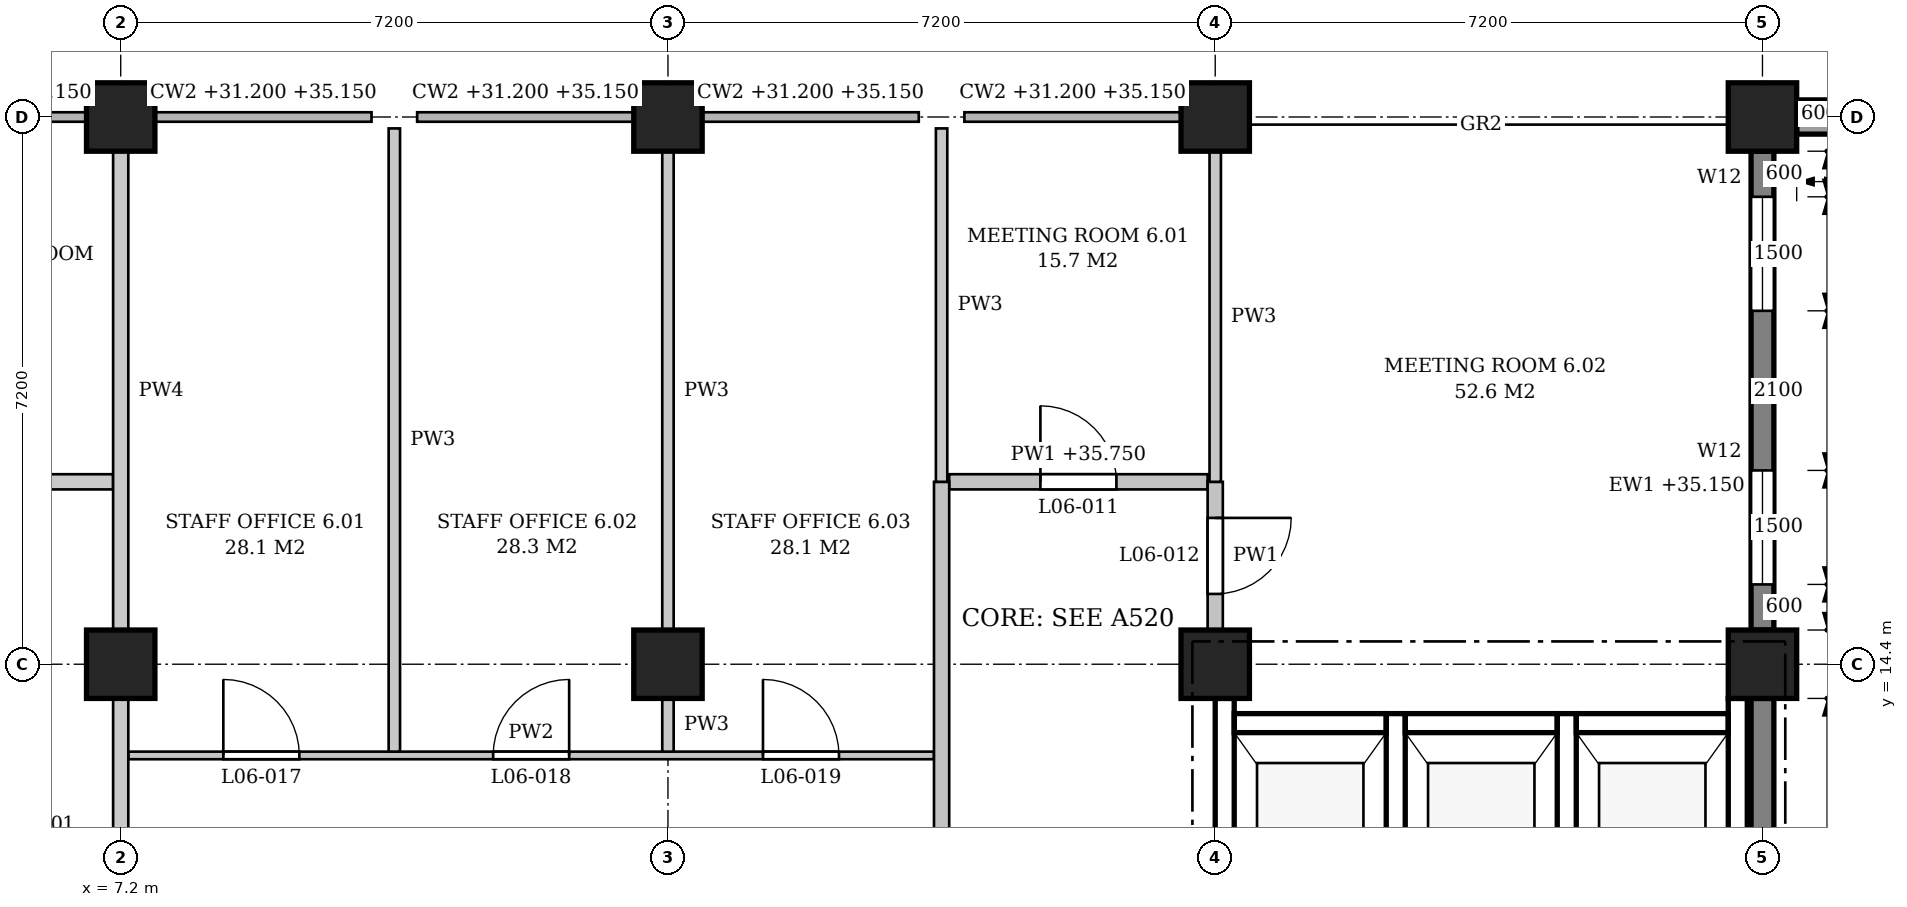
"""IFC4 building model, lengths in metres.
Left out: names, types, materials, properties, quantities, classifications, styles, units other than length and angle.
Written with IfcOpenShell. Run it as: python <this file> out.ifc"""

import sys

from ifc_helpers import new_model, si_unit, direction, frame, frame_2d, origin, origin_2d, place, context, subcontext, project, spatial, polyline, rectangle, outline, extrude, element, fill, save


model = new_model("IFC4")
c1 = context("Model", 3, precision=1e-05, world=origin(), true_north=direction((0.0, 1.0)))
c2 = subcontext(c1, "Body", "Model", "MODEL_VIEW")
j1 = project(units=[si_unit("LENGTHUNIT", "METRE"), si_unit("PLANEANGLEUNIT", "RADIAN")], contexts=[c1])
p1 = place(None, origin())
s1 = spatial("IfcSite", under=j1, at=p1, CompositionType="ELEMENT")
p2 = place(p1, origin())
s2 = spatial("IfcBuilding", under=s1, at=p2, CompositionType="ELEMENT")
p3 = place(p2, frame((0.0, 0.0, 31.2)))
s3 = spatial("IfcBuildingStorey", under=s2, at=p3, CompositionType="ELEMENT", Elevation=31.2)
for number, where, z_axis, x_axis in (
    (1, (7.2, 14.4, 0.0), (0.0, 0.0, 1.0), (1.0, 0.0, 0.0)),
    (2, (7.2, 21.6, 0.0), (0.0, 0.0, 1.0), (1.0, 0.0, 0.0)),
    (3, (14.4, 14.4, 0.0), (0.0, 0.0, 1.0), (1.0, 0.0, 0.0)),
    (4, (14.4, 21.6, 0.0), (0.0, 0.0, 1.0), (1.0, 0.0, 0.0)),
    (5, (21.6, 14.4, 0.0), (0.0, 0.0, 1.0), (1.0, 0.0, 0.0)),
    (6, (21.6, 21.6, 0.0), (0.0, 0.0, 1.0), (1.0, 0.0, 0.0)),
    (7, (28.8, 14.4, 0.0), (0.0, 0.0, 1.0), (1.0, 0.0, 0.0)),
    (8, (28.8, 21.6, 0.0), (0.0, 0.0, 1.0), (1.0, 0.0, 0.0)),
):
    element("IfcColumn", number, at=place(p3, frame(where, z_axis=z_axis, x_axis=x_axis)), inside=s3, PredefinedType="COLUMN", context=c2, shape_type="SweptSolid", body=[
        extrude(rectangle(XDim=0.9, YDim=0.9, at=origin_2d()), origin(), (0.0, 0.0, 1.0), 4.8),
    ])
p4 = place(p3, frame((28.8, 7.65, 0.0), z_axis=(0.0, 0.0, 1.0), x_axis=(0.0, 1.0, 0.0)))
e9 = element("IfcWall", 9, at=p4, inside=s3, PredefinedType="STANDARD", context=c2, shape_type="SweptSolid", body=[
    extrude(rectangle(XDim=6.3, YDim=0.3, at=frame_2d((3.15, 0.0))), origin(), (0.0, 0.0, 1.0), 3.95),
])
p5 = place(p4, frame((0.6, 0.0, 0.9)))
e10 = element("IfcOpeningElement", 10, at=p5, cuts=e9, PredefinedType="OPENING", context=c2, shape_type="SweptSolid", body=[
    extrude(outline(polyline([(0.0, 0.0), (1.5, 0.0), (1.5, 1.75), (0.75, 2.5), (0.0, 1.75), (0.0, 0.0)])), frame((0.0, 0.16, 0.0), z_axis=(0.0, -1.0, 0.0), x_axis=(1.0, 0.0, 0.0)), (0.0, 0.0, 1.0), 0.32),
])
p6 = place(p3, frame((28.8, 14.85, 0.0), z_axis=(0.0, 0.0, 1.0), x_axis=(0.0, 1.0, 0.0)))
e11 = element("IfcWall", 11, at=p6, inside=s3, PredefinedType="STANDARD", context=c2, shape_type="SweptSolid", body=[
    extrude(rectangle(XDim=6.3, YDim=0.3, at=frame_2d((3.15, 0.0))), origin(), (0.0, 0.0, 1.0), 3.95),
])
p7 = place(p6, frame((0.6, 0.0, 0.9)))
e12 = element("IfcOpeningElement", 12, at=p7, cuts=e11, PredefinedType="OPENING", context=c2, shape_type="SweptSolid", body=[
    extrude(outline(polyline([(0.0, 0.0), (1.5, 0.0), (1.5, 1.75), (0.75, 2.5), (0.0, 1.75), (0.0, 0.0)])), frame((0.0, 0.16, 0.0), z_axis=(0.0, -1.0, 0.0), x_axis=(1.0, 0.0, 0.0)), (0.0, 0.0, 1.0), 0.32),
])
p8 = place(p6, frame((4.2, 0.0, 0.9)))
e13 = element("IfcOpeningElement", 13, at=p8, cuts=e11, PredefinedType="OPENING", context=c2, shape_type="SweptSolid", body=[
    extrude(outline(polyline([(0.0, 0.0), (1.5, 0.0), (1.5, 1.75), (0.75, 2.5), (0.0, 1.75), (0.0, 0.0)])), frame((0.0, 0.16, 0.0), z_axis=(0.0, -1.0, 0.0), x_axis=(1.0, 0.0, 0.0)), (0.0, 0.0, 1.0), 0.32),
])
p9 = place(p3, frame((29.25, 21.6, 0.0), z_axis=(0.0, 0.0, 1.0), x_axis=(1.0, 0.0, 0.0)))
e14 = element("IfcWall", 14, at=p9, inside=s3, PredefinedType="STANDARD", context=c2, shape_type="SweptSolid", body=[
    extrude(rectangle(XDim=6.375, YDim=0.45, at=frame_2d((3.188, 0.0))), origin(), (0.0, 0.0, 1.0), 3.5),
])
p10 = place(p9, frame((0.6, 0.0, 0.9)))
e15 = element("IfcOpeningElement", 15, at=p10, cuts=e14, PredefinedType="OPENING", context=c2, shape_type="SweptSolid", body=[
    extrude(outline(polyline([(0.0, 0.0), (1.5, 0.0), (1.5, 1.75), (0.75, 2.5), (0.0, 1.75), (0.0, 0.0)])), frame((0.0, 0.235, 0.0), z_axis=(0.0, -1.0, 0.0), x_axis=(1.0, 0.0, 0.0)), (0.0, 0.0, 1.0), 0.47),
])
p11 = place(p9, frame((4.2, 0.0, 0.9)))
e16 = element("IfcOpeningElement", 16, at=p11, cuts=e14, PredefinedType="OPENING", context=c2, shape_type="SweptSolid", body=[
    extrude(outline(polyline([(0.0, 0.0), (1.5, 0.0), (1.5, 1.75), (0.75, 2.5), (0.0, 1.75), (0.0, 0.0)])), frame((0.0, 0.235, 0.0), z_axis=(0.0, -1.0, 0.0), x_axis=(1.0, 0.0, 0.0)), (0.0, 0.0, 1.0), 0.47),
])
p12 = place(p3, frame((21.725, 10.45, -0.25), z_axis=(0.0, 0.0, 1.0), x_axis=(0.0, 1.0, 0.0)))
e17 = element("IfcWall", 17, at=p12, inside=s3, PredefinedType="SHEAR", context=c2, shape_type="SweptSolid", body=[
    extrude(rectangle(XDim=3.5, YDim=0.25, at=frame_2d((1.75, 0.0))), origin(), (0.0, 0.0, 1.0), 4.05),
])
for number, where, z_axis, x_axis in (
    (18, (23.975, 10.45, -0.25), (0.0, 0.0, 1.0), (0.0, 1.0, 0.0)),
    (19, (26.225, 10.45, -0.25), (0.0, 0.0, 1.0), (0.0, 1.0, 0.0)),
):
    element("IfcWall", number, at=place(p3, frame(where, z_axis=z_axis, x_axis=x_axis)), inside=s3, PredefinedType="SHEAR", context=c2, shape_type="SweptSolid", body=[
        extrude(rectangle(XDim=3.3, YDim=0.25, at=frame_2d((1.65, 0.0))), origin(), (0.0, 0.0, 1.0), 4.8),
    ])
p13 = place(p3, frame((28.475, 10.45, -0.25), z_axis=(0.0, 0.0, 1.0), x_axis=(0.0, 1.0, 0.0)))
e20 = element("IfcWall", 20, at=p13, inside=s3, PredefinedType="SHEAR", context=c2, shape_type="SweptSolid", body=[
    extrude(rectangle(XDim=3.5, YDim=0.25, at=frame_2d((1.75, 0.0))), origin(), (0.0, 0.0, 1.0), 4.8),
])
for number, where, z_axis, x_axis in (
    (21, (21.85, 13.625, -0.25), (0.0, 0.0, 1.0), (1.0, 0.0, 0.0)),
    (22, (24.1, 13.625, -0.25), (0.0, 0.0, 1.0), (1.0, 0.0, 0.0)),
    (23, (26.35, 13.625, -0.25), (0.0, 0.0, 1.0), (1.0, 0.0, 0.0)),
):
    element("IfcWall", number, at=place(p3, frame(where, z_axis=z_axis, x_axis=x_axis)), inside=s3, PredefinedType="SHEAR", context=c2, shape_type="SweptSolid", body=[
        extrude(rectangle(XDim=2.0, YDim=0.25, at=frame_2d((1.0, 0.0))), origin(), (0.0, 0.0, 1.0), 4.8),
    ])
p14 = place(p3, frame((7.3, 13.2, 0.0), z_axis=(0.0, 0.0, 1.0), x_axis=(1.0, 0.0, 0.0)))
e24 = element("IfcWall", 24, at=p14, inside=s3, PredefinedType="PARTITIONING", context=c2, shape_type="SweptSolid", body=[
    extrude(rectangle(XDim=10.6, YDim=0.1, at=frame_2d((5.3, 0.0))), origin(), (0.0, 0.0, 1.0), 3.8),
])
p15 = place(p14, frame((1.25, 0.0, 0.0)))
e25 = element("IfcOpeningElement", 25, at=p15, cuts=e24, PredefinedType="OPENING", context=c2, shape_type="SweptSolid", body=[
    extrude(rectangle(XDim=1.0, YDim=2.1, at=frame_2d((0.5, 1.05))), frame((0.0, 0.06, 0.0), z_axis=(0.0, -1.0, 0.0), x_axis=(1.0, 0.0, 0.0)), (0.0, 0.0, 1.0), 0.12),
])
p16 = place(p14, frame((4.8, 0.0, 0.0)))
e26 = element("IfcOpeningElement", 26, at=p16, cuts=e24, PredefinedType="OPENING", context=c2, shape_type="SweptSolid", body=[
    extrude(rectangle(XDim=1.0, YDim=2.1, at=frame_2d((0.5, 1.05))), frame((0.0, 0.06, 0.0), z_axis=(0.0, -1.0, 0.0), x_axis=(1.0, 0.0, 0.0)), (0.0, 0.0, 1.0), 0.12),
])
p17 = place(p14, frame((8.35, 0.0, 0.0)))
e27 = element("IfcOpeningElement", 27, at=p17, cuts=e24, PredefinedType="OPENING", context=c2, shape_type="SweptSolid", body=[
    extrude(rectangle(XDim=1.0, YDim=2.1, at=frame_2d((0.5, 1.05))), frame((0.0, 0.06, 0.0), z_axis=(0.0, -1.0, 0.0), x_axis=(1.0, 0.0, 0.0)), (0.0, 0.0, 1.0), 0.12),
])
p18 = place(p3, frame((3.7, 16.8, 0.0), z_axis=(0.0, 0.0, 1.0), x_axis=(1.0, 0.0, 0.0)))
e28 = element("IfcWall", 28, at=p18, inside=s3, PredefinedType="PARTITIONING", context=c2, shape_type="SweptSolid", body=[
    extrude(outline(polyline([(0.0, 0.0), (3.4, 0.0), (3.4, 3.8), (3.25, 3.8), (3.25, 4.55), (0.0, 4.55), (0.0, 0.0)])), frame((0.0, 0.1, 0.0), z_axis=(0.0, -1.0, 0.0), x_axis=(1.0, 0.0, 0.0)), (0.0, 0.0, 1.0), 0.2),
])
p19 = place(p18, frame((1.2, 0.0, 0.0)))
e29 = element("IfcOpeningElement", 29, at=p19, cuts=e28, PredefinedType="OPENING", context=c2, shape_type="SweptSolid", body=[
    extrude(rectangle(XDim=1.0, YDim=2.1, at=frame_2d((0.5, 1.05))), frame((0.0, 0.11, 0.0), z_axis=(0.0, -1.0, 0.0), x_axis=(1.0, 0.0, 0.0)), (0.0, 0.0, 1.0), 0.22),
])
p20 = place(p3, frame((18.1, 16.8, 0.0), z_axis=(0.0, 0.0, 1.0), x_axis=(1.0, 0.0, 0.0)))
e30 = element("IfcWall", 30, at=p20, inside=s3, PredefinedType="PARTITIONING", context=c2, shape_type="SweptSolid", body=[
    extrude(outline(polyline([(0.0, 0.0), (3.4, 0.0), (3.4, 3.8), (3.25, 3.8), (3.25, 4.55), (0.0, 4.55), (0.0, 0.0)])), frame((0.0, 0.1, 0.0), z_axis=(0.0, -1.0, 0.0), x_axis=(1.0, 0.0, 0.0)), (0.0, 0.0, 1.0), 0.2),
])
p21 = place(p20, frame((1.2, 0.0, 0.0)))
e31 = element("IfcOpeningElement", 31, at=p21, cuts=e30, PredefinedType="OPENING", context=c2, shape_type="SweptSolid", body=[
    extrude(rectangle(XDim=1.0, YDim=2.1, at=frame_2d((0.5, 1.05))), frame((0.0, 0.11, 0.0), z_axis=(0.0, -1.0, 0.0), x_axis=(1.0, 0.0, 0.0)), (0.0, 0.0, 1.0), 0.22),
])
p22 = place(p3, frame((7.2, 9.7, 0.0), z_axis=(0.0, 0.0, 1.0), x_axis=(0.0, 1.0, 0.0)))
e32 = element("IfcWall", 32, at=p22, inside=s3, PredefinedType="PARTITIONING", context=c2, shape_type="SweptSolid", body=[
    extrude(rectangle(XDim=4.25, YDim=0.2, at=frame_2d((2.125, 0.0))), origin(), (0.0, 0.0, 1.0), 3.8),
])
p23 = place(p3, frame((7.2, 14.85, 0.0), z_axis=(0.0, 0.0, 1.0), x_axis=(0.0, 1.0, 0.0)))
e33 = element("IfcWall", 33, at=p23, inside=s3, PredefinedType="PARTITIONING", context=c2, shape_type="SweptSolid", body=[
    extrude(rectangle(XDim=6.3, YDim=0.2, at=frame_2d((3.15, 0.0))), origin(), (0.0, 0.0, 1.0), 3.8),
])
p24 = place(p3, frame((10.8, 13.25, 0.0), z_axis=(0.0, 0.0, 1.0), x_axis=(0.0, 1.0, 0.0)))
e34 = element("IfcWall", 34, at=p24, inside=s3, PredefinedType="PARTITIONING", context=c2, shape_type="SweptSolid", body=[
    extrude(rectangle(XDim=8.2, YDim=0.15, at=frame_2d((4.1, 0.0))), origin(), (0.0, 0.0, 1.0), 3.8),
])
p25 = place(p3, frame((14.4, 13.25, 0.0), z_axis=(0.0, 0.0, 1.0), x_axis=(0.0, 1.0, 0.0)))
e35 = element("IfcWall", 35, at=p25, inside=s3, PredefinedType="PARTITIONING", context=c2, shape_type="SweptSolid", body=[
    extrude(rectangle(XDim=0.7, YDim=0.15, at=frame_2d((0.35, 0.0))), origin(), (0.0, 0.0, 1.0), 3.8),
])
p26 = place(p3, frame((14.4, 14.85, 0.0), z_axis=(0.0, 0.0, 1.0), x_axis=(0.0, 1.0, 0.0)))
e36 = element("IfcWall", 36, at=p26, inside=s3, PredefinedType="PARTITIONING", context=c2, shape_type="SweptSolid", body=[
    extrude(rectangle(XDim=6.3, YDim=0.15, at=frame_2d((3.15, 0.0))), origin(), (0.0, 0.0, 1.0), 3.8),
])
p27 = place(p3, frame((18.0, 9.7, 0.0), z_axis=(0.0, 0.0, 1.0), x_axis=(0.0, 1.0, 0.0)))
e37 = element("IfcWall", 37, at=p27, inside=s3, PredefinedType="PARTITIONING", context=c2, shape_type="SweptSolid", body=[
    extrude(outline(polyline([(0.0, 0.0), (7.1, 0.0), (7.1, 4.55), (4.95, 4.55), (4.95, 3.8), (4.45, 3.8), (4.45, 4.55), (0.0, 4.55), (0.0, 0.0)])), frame((0.0, 0.1, 0.0), z_axis=(0.0, -1.0, 0.0), x_axis=(1.0, 0.0, 0.0)), (0.0, 0.0, 1.0), 0.2),
])
p28 = place(p3, frame((18.0, 16.8, 0.0), z_axis=(0.0, 0.0, 1.0), x_axis=(0.0, 1.0, 0.0)))
e38 = element("IfcWall", 38, at=p28, inside=s3, PredefinedType="PARTITIONING", context=c2, shape_type="SweptSolid", body=[
    extrude(rectangle(XDim=4.65, YDim=0.15, at=frame_2d((2.325, 0.0))), origin(), (0.0, 0.0, 1.0), 3.8),
])
p29 = place(p3, frame((21.6, 14.85, 0.0), z_axis=(0.0, 0.0, 1.0), x_axis=(0.0, 1.0, 0.0)))
e39 = element("IfcWall", 39, at=p29, inside=s3, PredefinedType="PARTITIONING", context=c2, shape_type="SweptSolid", body=[
    extrude(rectangle(XDim=1.95, YDim=0.2, at=frame_2d((0.975, 0.0))), origin(), (0.0, 0.0, 1.0), 3.8),
])
p30 = place(p29, frame((0.475, 0.0, 0.0)))
e40 = element("IfcOpeningElement", 40, at=p30, cuts=e39, PredefinedType="OPENING", context=c2, shape_type="SweptSolid", body=[
    extrude(rectangle(XDim=1.0, YDim=2.1, at=frame_2d((0.5, 1.05))), frame((0.0, 0.11, 0.0), z_axis=(0.0, -1.0, 0.0), x_axis=(1.0, 0.0, 0.0)), (0.0, 0.0, 1.0), 0.22),
])
p31 = place(p3, frame((21.6, 16.8, 0.0), z_axis=(0.0, 0.0, 1.0), x_axis=(0.0, 1.0, 0.0)))
e41 = element("IfcWall", 41, at=p31, inside=s3, PredefinedType="PARTITIONING", context=c2, shape_type="SweptSolid", body=[
    extrude(rectangle(XDim=4.35, YDim=0.15, at=frame_2d((2.175, 0.0))), origin(), (0.0, 0.0, 1.0), 3.8),
])
p32 = place(p7, origin())
e42 = element("IfcWindow", 42, at=p32, inside=s3, PartitioningType="SINGLE_PANEL", PredefinedType="WINDOW", context=c2, shape_type="SweptSolid", body=[
    extrude(outline(polyline([(0.0, 0.0), (1.5, 0.0), (1.5, 1.75), (0.75, 2.5), (0.0, 1.75), (0.0, 0.0)])), frame((0.0, 0.03, 0.0), z_axis=(0.0, -1.0, 0.0), x_axis=(1.0, 0.0, 0.0)), (0.0, 0.0, 1.0), 0.06),
])
fill(e12, e42)
p33 = place(p8, origin())
e43 = element("IfcWindow", 43, at=p33, inside=s3, PartitioningType="SINGLE_PANEL", PredefinedType="WINDOW", context=c2, shape_type="SweptSolid", body=[
    extrude(outline(polyline([(0.0, 0.0), (1.5, 0.0), (1.5, 1.75), (0.75, 2.5), (0.0, 1.75), (0.0, 0.0)])), frame((0.0, 0.03, 0.0), z_axis=(0.0, -1.0, 0.0), x_axis=(1.0, 0.0, 0.0)), (0.0, 0.0, 1.0), 0.06),
])
fill(e13, e43)
p34 = place(p21, origin())
e44 = element("IfcDoor", 44, at=p34, inside=s3, OperationType="SINGLE_SWING_LEFT", PredefinedType="DOOR", context=c2, shape_type="SweptSolid", body=[
    extrude(rectangle(XDim=1.0, YDim=2.1, at=frame_2d((0.5, 1.05))), frame((0.0, 0.025, 0.0), z_axis=(0.0, -1.0, 0.0), x_axis=(1.0, 0.0, 0.0)), (0.0, 0.0, 1.0), 0.05),
])
fill(e31, e44)
p35 = place(p30, frame((1.0, 0.0, 0.0), z_axis=(0.0, 0.0, 1.0), x_axis=(-1.0, 0.0, 0.0)))
e45 = element("IfcDoor", 45, at=p35, inside=s3, OperationType="SINGLE_SWING_LEFT", PredefinedType="DOOR", context=c2, shape_type="SweptSolid", body=[
    extrude(rectangle(XDim=1.0, YDim=2.1, at=frame_2d((0.5, 1.05))), frame((0.0, 0.025, 0.0), z_axis=(0.0, -1.0, 0.0), x_axis=(1.0, 0.0, 0.0)), (0.0, 0.0, 1.0), 0.05),
])
fill(e40, e45)
p36 = place(p15, origin())
e46 = element("IfcDoor", 46, at=p36, inside=s3, OperationType="SINGLE_SWING_LEFT", PredefinedType="DOOR", context=c2, shape_type="SweptSolid", body=[
    extrude(rectangle(XDim=1.0, YDim=2.1, at=frame_2d((0.5, 1.05))), frame((0.0, 0.025, 0.0), z_axis=(0.0, -1.0, 0.0), x_axis=(1.0, 0.0, 0.0)), (0.0, 0.0, 1.0), 0.05),
])
fill(e25, e46)
p37 = place(p16, origin())
e47 = element("IfcDoor", 47, at=p37, inside=s3, OperationType="SINGLE_SWING_RIGHT", PredefinedType="DOOR", context=c2, shape_type="SweptSolid", body=[
    extrude(rectangle(XDim=1.0, YDim=2.1, at=frame_2d((0.5, 1.05))), frame((0.0, 0.025, 0.0), z_axis=(0.0, -1.0, 0.0), x_axis=(1.0, 0.0, 0.0)), (0.0, 0.0, 1.0), 0.05),
])
fill(e26, e47)
p38 = place(p17, origin())
e48 = element("IfcDoor", 48, at=p38, inside=s3, OperationType="SINGLE_SWING_LEFT", PredefinedType="DOOR", context=c2, shape_type="SweptSolid", body=[
    extrude(rectangle(XDim=1.0, YDim=2.1, at=frame_2d((0.5, 1.05))), frame((0.0, 0.025, 0.0), z_axis=(0.0, -1.0, 0.0), x_axis=(1.0, 0.0, 0.0)), (0.0, 0.0, 1.0), 0.05),
])
fill(e27, e48)
save(model, sys.argv[1])
